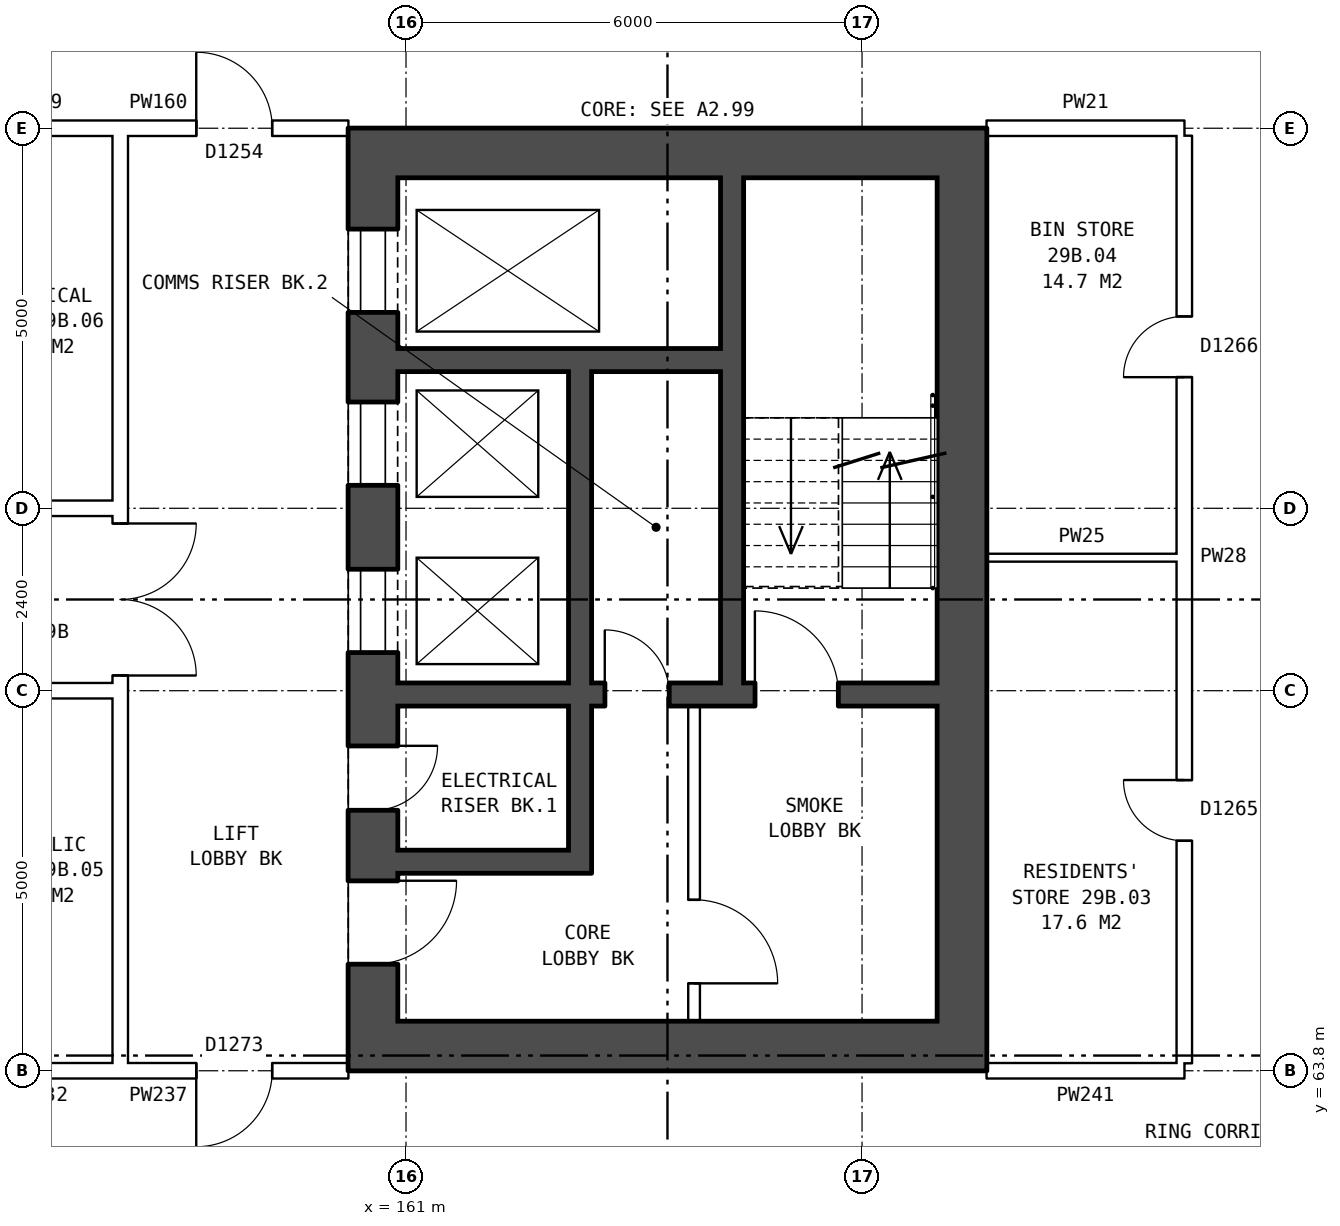
"""IFC4 building model, lengths in metres.
Left out: names, types, materials, properties, quantities, classifications, styles, units other than length and angle.
Written with IfcOpenShell. Run it as: python <this file> out.ifc"""

import sys

from ifc_helpers import new_model, si_unit, direction, frame, frame_2d, origin, place, context, subcontext, project, spatial, rectangle, extrude, element, fill, save


model = new_model("IFC4")
c1 = context("Model", 3, precision=1e-05, world=origin(), true_north=direction((0.0, 1.0)))
c2 = subcontext(c1, "Body", "Model", "MODEL_VIEW")
j1 = project(units=[si_unit("LENGTHUNIT", "METRE"), si_unit("PLANEANGLEUNIT", "RADIAN")], contexts=[c1])
p1 = place(None, origin())
s1 = spatial("IfcSite", under=j1, at=p1, CompositionType="ELEMENT")
p2 = place(p1, origin())
s2 = spatial("IfcBuilding", under=s1, at=p2, CompositionType="ELEMENT")
p3 = place(p2, frame((0.0, 0.0, 105.7)))
s3 = spatial("IfcBuildingStorey", under=s2, at=p3, CompositionType="ELEMENT", Elevation=105.7)
p4 = place(p3, frame((160.565, 75.55, 0.0), z_axis=(0.0, 0.0, 1.0), x_axis=(0.0, -1.0, 0.0)))
e1 = element("IfcWall", 1, at=p4, inside=s3, PredefinedType="SHEAR", context=c2, shape_type="SweptSolid", body=[
    extrude(rectangle(XDim=11.1, YDim=0.65, at=frame_2d((5.55, 0.0))), origin(), (0.0, 0.0, 1.0), 2.85),
])
p5 = place(p4, frame((0.675, 0.0, 0.0)))
e2 = element("IfcOpeningElement", 2, at=p5, cuts=e1, PredefinedType="OPENING", context=c2, shape_type="SweptSolid", body=[
    extrude(rectangle(XDim=1.1, YDim=2.1, at=frame_2d((0.55, 1.05))), frame((0.0, 0.335, 0.0), z_axis=(0.0, -1.0, 0.0), x_axis=(1.0, 0.0, 0.0)), (0.0, 0.0, 1.0), 0.67),
])
p6 = place(p4, frame((2.95, 0.0, 0.0)))
e3 = element("IfcOpeningElement", 3, at=p6, cuts=e1, PredefinedType="OPENING", context=c2, shape_type="SweptSolid", body=[
    extrude(rectangle(XDim=1.1, YDim=2.1, at=frame_2d((0.55, 1.05))), frame((0.0, 0.335, 0.0), z_axis=(0.0, -1.0, 0.0), x_axis=(1.0, 0.0, 0.0)), (0.0, 0.0, 1.0), 0.67),
])
p7 = place(p4, frame((5.15, 0.0, 0.0)))
e4 = element("IfcOpeningElement", 4, at=p7, cuts=e1, PredefinedType="OPENING", context=c2, shape_type="SweptSolid", body=[
    extrude(rectangle(XDim=1.1, YDim=2.1, at=frame_2d((0.55, 1.05))), frame((0.0, 0.335, 0.0), z_axis=(0.0, -1.0, 0.0), x_axis=(1.0, 0.0, 0.0)), (0.0, 0.0, 1.0), 0.67),
])
p8 = place(p4, frame((9.25, 0.0, 0.0)))
e5 = element("IfcOpeningElement", 5, at=p8, cuts=e1, PredefinedType="OPENING", context=c2, shape_type="SweptSolid", body=[
    extrude(rectangle(XDim=1.1, YDim=2.1, at=frame_2d((0.55, 1.05))), frame((0.0, 0.335, 0.0), z_axis=(0.0, -1.0, 0.0), x_axis=(1.0, 0.0, 0.0)), (0.0, 0.0, 1.0), 0.67),
])
p9 = place(p4, frame((7.475, 0.0, 0.0)))
e6 = element("IfcOpeningElement", 6, at=p9, cuts=e1, PredefinedType="OPENING", context=c2, shape_type="SweptSolid", body=[
    extrude(rectangle(XDim=0.85, YDim=2.1, at=frame_2d((0.425, 1.05))), frame((0.0, 0.335, 0.0), z_axis=(0.0, -1.0, 0.0), x_axis=(1.0, 0.0, 0.0)), (0.0, 0.0, 1.0), 0.67),
])
p10 = place(p3, frame((168.315, 75.55, 0.0), z_axis=(0.0, 0.0, 1.0), x_axis=(0.0, -1.0, 0.0)))
e7 = element("IfcWall", 7, at=p10, inside=s3, PredefinedType="SHEAR", context=c2, shape_type="SweptSolid", body=[
    extrude(rectangle(XDim=11.1, YDim=0.65, at=frame_2d((5.55, 0.0))), origin(), (0.0, 0.0, 1.0), 2.85),
])
for number, where, z_axis, x_axis in (
    (8, (160.24, 75.875, 0.0), (0.0, 0.0, 1.0), (1.0, 0.0, 0.0)),
    (9, (160.24, 64.125, 0.0), (0.0, 0.0, 1.0), (1.0, 0.0, 0.0)),
):
    element("IfcWall", number, at=place(p3, frame(where, z_axis=z_axis, x_axis=x_axis)), inside=s3, PredefinedType="SHEAR", context=c2, shape_type="SweptSolid", body=[
        extrude(rectangle(XDim=8.4, YDim=0.65, at=frame_2d((4.2, 0.0))), origin(), (0.0, 0.0, 1.0), 2.85),
    ])
p11 = place(p3, frame((160.89, 73.15, 0.0), z_axis=(0.0, 0.0, 1.0), x_axis=(1.0, 0.0, 0.0)))
e10 = element("IfcWall", 10, at=p11, inside=s3, PredefinedType="SHEAR", context=c2, shape_type="SweptSolid", body=[
    extrude(rectangle(XDim=4.25, YDim=0.3, at=frame_2d((2.125, 0.0))), origin(), (0.0, 0.0, 1.0), 2.85),
])
p12 = place(p3, frame((160.89, 68.75, 0.0), z_axis=(0.0, 0.0, 1.0), x_axis=(1.0, 0.0, 0.0)))
e11 = element("IfcWall", 11, at=p12, inside=s3, PredefinedType="SHEAR", context=c2, shape_type="SweptSolid", body=[
    extrude(rectangle(XDim=7.1, YDim=0.3, at=frame_2d((3.55, 0.0))), origin(), (0.0, 0.0, 1.0), 2.85),
])
p13 = place(p12, frame((4.7, 0.0, 0.0)))
e12 = element("IfcOpeningElement", 12, at=p13, cuts=e11, PredefinedType="OPENING", context=c2, shape_type="SweptSolid", body=[
    extrude(rectangle(XDim=1.1, YDim=2.1, at=frame_2d((0.55, 1.05))), frame((0.0, 0.16, 0.0), z_axis=(0.0, -1.0, 0.0), x_axis=(1.0, 0.0, 0.0)), (0.0, 0.0, 1.0), 0.32),
])
p14 = place(p12, frame((2.725, 0.0, 0.0)))
e13 = element("IfcOpeningElement", 13, at=p14, cuts=e11, PredefinedType="OPENING", context=c2, shape_type="SweptSolid", body=[
    extrude(rectangle(XDim=0.85, YDim=2.1, at=frame_2d((0.425, 1.05))), frame((0.0, 0.16, 0.0), z_axis=(0.0, -1.0, 0.0), x_axis=(1.0, 0.0, 0.0)), (0.0, 0.0, 1.0), 0.32),
])
p15 = place(p3, frame((160.89, 66.55, 0.0), z_axis=(0.0, 0.0, 1.0), x_axis=(1.0, 0.0, 0.0)))
e14 = element("IfcWall", 14, at=p15, inside=s3, PredefinedType="SHEAR", context=c2, shape_type="SweptSolid", body=[
    extrude(rectangle(XDim=2.25, YDim=0.3, at=frame_2d((1.125, 0.0))), origin(), (0.0, 0.0, 1.0), 2.85),
])
p16 = place(p3, frame((163.29, 73.0, 0.0), z_axis=(0.0, 0.0, 1.0), x_axis=(0.0, -1.0, 0.0)))
e15 = element("IfcWall", 15, at=p16, inside=s3, PredefinedType="SHEAR", context=c2, shape_type="SweptSolid", body=[
    extrude(rectangle(XDim=4.1, YDim=0.3, at=frame_2d((2.05, 0.0))), origin(), (0.0, 0.0, 1.0), 2.85),
])
p17 = place(p3, frame((163.29, 68.6, 0.0), z_axis=(0.0, 0.0, 1.0), x_axis=(0.0, -1.0, 0.0)))
e16 = element("IfcWall", 16, at=p17, inside=s3, PredefinedType="SHEAR", context=c2, shape_type="SweptSolid", body=[
    extrude(rectangle(XDim=2.2, YDim=0.3, at=frame_2d((1.1, 0.0))), origin(), (0.0, 0.0, 1.0), 2.85),
])
p18 = place(p3, frame((164.79, 68.6, 0.0), z_axis=(0.0, 0.0, 1.0), x_axis=(0.0, -1.0, 0.0)))
e17 = element("IfcWall", 17, at=p18, inside=s3, PredefinedType="PARTITIONING", context=c2, shape_type="SweptSolid", body=[
    extrude(rectangle(XDim=4.15, YDim=0.15, at=frame_2d((2.075, 0.0))), origin(), (0.0, 0.0, 1.0), 2.85),
])
p19 = place(p18, frame((2.55, 0.0, 0.0)))
e18 = element("IfcOpeningElement", 18, at=p19, cuts=e17, PredefinedType="OPENING", context=c2, shape_type="SweptSolid", body=[
    extrude(rectangle(XDim=1.1, YDim=2.1, at=frame_2d((0.55, 1.05))), frame((0.0, 0.085, 0.0), z_axis=(0.0, -1.0, 0.0), x_axis=(1.0, 0.0, 0.0)), (0.0, 0.0, 1.0), 0.17),
])
p20 = place(p3, frame((165.29, 75.55, 0.0), z_axis=(0.0, 0.0, 1.0), x_axis=(0.0, -1.0, 0.0)))
e19 = element("IfcWall", 19, at=p20, inside=s3, PredefinedType="SHEAR", context=c2, shape_type="SweptSolid", body=[
    extrude(rectangle(XDim=6.65, YDim=0.3, at=frame_2d((3.325, 0.0))), origin(), (0.0, 0.0, 1.0), 2.85),
])
p21 = place(p3, frame((157.24, 63.9, 0.0), z_axis=(0.0, 0.0, 1.0), x_axis=(0.0, 1.0, 0.0)))
e20 = element("IfcWall", 20, at=p21, inside=s3, PredefinedType="PARTITIONING", context=c2, shape_type="SweptSolid", body=[
    extrude(rectangle(XDim=12.2, YDim=0.2, at=frame_2d((6.1, 0.0))), origin(), (0.0, 0.0, 1.0), 2.85),
])
p22 = place(p21, frame((5.1, 0.0, 0.0)))
e21 = element("IfcOpeningElement", 21, at=p22, cuts=e20, PredefinedType="OPENING", context=c2, shape_type="SweptSolid", body=[
    extrude(rectangle(XDim=2.0, YDim=2.1, at=frame_2d((1.0, 1.05))), frame((0.0, 0.11, 0.0), z_axis=(0.0, -1.0, 0.0), x_axis=(1.0, 0.0, 0.0)), (0.0, 0.0, 1.0), 0.22),
])
p23 = place(p3, frame((155.1, 63.8, 0.0), z_axis=(0.0, 0.0, 1.0), x_axis=(1.0, 0.0, 0.0)))
e22 = element("IfcWall", 22, at=p23, inside=s3, PredefinedType="PARTITIONING", context=c2, shape_type="SweptSolid", body=[
    extrude(rectangle(XDim=2.14, YDim=0.2, at=frame_2d((1.07, 0.0))), origin(), (0.0, 0.0, 1.0), 2.85),
])
p24 = place(p3, frame((157.24, 63.8, 0.0), z_axis=(0.0, 0.0, 1.0), x_axis=(1.0, 0.0, 0.0)))
e23 = element("IfcWall", 23, at=p24, inside=s3, PredefinedType="PARTITIONING", context=c2, shape_type="SweptSolid", body=[
    extrude(rectangle(XDim=3.0, YDim=0.2, at=frame_2d((1.5, 0.0))), origin(), (0.0, 0.0, 1.0), 2.85),
])
p25 = place(p24, frame((1.0, 0.0, 0.0)))
e24 = element("IfcOpeningElement", 24, at=p25, cuts=e23, PredefinedType="OPENING", context=c2, shape_type="SweptSolid", body=[
    extrude(rectangle(XDim=1.0, YDim=2.1, at=frame_2d((0.5, 1.05))), frame((0.0, 0.11, 0.0), z_axis=(0.0, -1.0, 0.0), x_axis=(1.0, 0.0, 0.0)), (0.0, 0.0, 1.0), 0.22),
])
p26 = place(p3, frame((168.64, 63.8, 0.0), z_axis=(0.0, 0.0, 1.0), x_axis=(1.0, 0.0, 0.0)))
e25 = element("IfcWall", 25, at=p26, inside=s3, PredefinedType="PARTITIONING", context=c2, shape_type="SweptSolid", body=[
    extrude(rectangle(XDim=2.6, YDim=0.2, at=frame_2d((1.3, 0.0))), origin(), (0.0, 0.0, 1.0), 2.85),
])
p27 = place(p3, frame((142.76, 68.8, 0.0), z_axis=(0.0, 0.0, 1.0), x_axis=(1.0, 0.0, 0.0)))
e26 = element("IfcWall", 26, at=p27, inside=s3, PredefinedType="PARTITIONING", context=c2, shape_type="SweptSolid", body=[
    extrude(rectangle(XDim=14.48, YDim=0.2, at=frame_2d((7.24, 0.0))), origin(), (0.0, 0.0, 1.0), 2.85),
])
p28 = place(p27, frame((4.24, 0.0, 0.0)))
e27 = element("IfcOpeningElement", 27, at=p28, cuts=e26, PredefinedType="OPENING", context=c2, shape_type="SweptSolid", body=[
    extrude(rectangle(XDim=1.0, YDim=2.1, at=frame_2d((0.5, 1.05))), frame((0.0, 0.11, 0.0), z_axis=(0.0, -1.0, 0.0), x_axis=(1.0, 0.0, 0.0)), (0.0, 0.0, 1.0), 0.22),
])
p29 = place(p27, frame((10.24, 0.0, 0.0)))
e28 = element("IfcOpeningElement", 28, at=p29, cuts=e26, PredefinedType="OPENING", context=c2, shape_type="SweptSolid", body=[
    extrude(rectangle(XDim=1.0, YDim=2.1, at=frame_2d((0.5, 1.05))), frame((0.0, 0.11, 0.0), z_axis=(0.0, -1.0, 0.0), x_axis=(1.0, 0.0, 0.0)), (0.0, 0.0, 1.0), 0.22),
])
p30 = place(p3, frame((168.64, 70.55, 0.0), z_axis=(0.0, 0.0, 1.0), x_axis=(1.0, 0.0, 0.0)))
e29 = element("IfcWall", 29, at=p30, inside=s3, PredefinedType="PARTITIONING", context=c2, shape_type="SweptSolid", body=[
    extrude(rectangle(XDim=2.5, YDim=0.1, at=frame_2d((1.25, 0.0))), origin(), (0.0, 0.0, 1.0), 2.85),
])
p31 = place(p3, frame((142.76, 71.2, 0.0), z_axis=(0.0, 0.0, 1.0), x_axis=(1.0, 0.0, 0.0)))
e30 = element("IfcWall", 30, at=p31, inside=s3, PredefinedType="PARTITIONING", context=c2, shape_type="SweptSolid", body=[
    extrude(rectangle(XDim=14.48, YDim=0.2, at=frame_2d((7.24, 0.0))), origin(), (0.0, 0.0, 1.0), 2.85),
])
p32 = place(p31, frame((4.24, 0.0, 0.0)))
e31 = element("IfcOpeningElement", 31, at=p32, cuts=e30, PredefinedType="OPENING", context=c2, shape_type="SweptSolid", body=[
    extrude(rectangle(XDim=1.0, YDim=2.1, at=frame_2d((0.5, 1.05))), frame((0.0, 0.11, 0.0), z_axis=(0.0, -1.0, 0.0), x_axis=(1.0, 0.0, 0.0)), (0.0, 0.0, 1.0), 0.22),
])
p33 = place(p31, frame((10.24, 0.0, 0.0)))
e32 = element("IfcOpeningElement", 32, at=p33, cuts=e30, PredefinedType="OPENING", context=c2, shape_type="SweptSolid", body=[
    extrude(rectangle(XDim=1.0, YDim=2.1, at=frame_2d((0.5, 1.05))), frame((0.0, 0.11, 0.0), z_axis=(0.0, -1.0, 0.0), x_axis=(1.0, 0.0, 0.0)), (0.0, 0.0, 1.0), 0.22),
])
p34 = place(p3, frame((155.1, 76.2, 0.0), z_axis=(0.0, 0.0, 1.0), x_axis=(1.0, 0.0, 0.0)))
e33 = element("IfcWall", 33, at=p34, inside=s3, PredefinedType="PARTITIONING", context=c2, shape_type="SweptSolid", body=[
    extrude(rectangle(XDim=2.14, YDim=0.2, at=frame_2d((1.07, 0.0))), origin(), (0.0, 0.0, 1.0), 2.85),
])
p35 = place(p3, frame((157.24, 76.2, 0.0), z_axis=(0.0, 0.0, 1.0), x_axis=(1.0, 0.0, 0.0)))
e34 = element("IfcWall", 34, at=p35, inside=s3, PredefinedType="PARTITIONING", context=c2, shape_type="SweptSolid", body=[
    extrude(rectangle(XDim=3.0, YDim=0.2, at=frame_2d((1.5, 0.0))), origin(), (0.0, 0.0, 1.0), 2.85),
])
p36 = place(p35, frame((1.0, 0.0, 0.0)))
e35 = element("IfcOpeningElement", 35, at=p36, cuts=e34, PredefinedType="OPENING", context=c2, shape_type="SweptSolid", body=[
    extrude(rectangle(XDim=1.0, YDim=2.1, at=frame_2d((0.5, 1.05))), frame((0.0, 0.11, 0.0), z_axis=(0.0, -1.0, 0.0), x_axis=(1.0, 0.0, 0.0)), (0.0, 0.0, 1.0), 0.22),
])
p37 = place(p3, frame((168.64, 76.2, 0.0), z_axis=(0.0, 0.0, 1.0), x_axis=(1.0, 0.0, 0.0)))
e36 = element("IfcWall", 36, at=p37, inside=s3, PredefinedType="PARTITIONING", context=c2, shape_type="SweptSolid", body=[
    extrude(rectangle(XDim=2.6, YDim=0.2, at=frame_2d((1.3, 0.0))), origin(), (0.0, 0.0, 1.0), 2.85),
])
p38 = place(p3, frame((171.24, 63.9, 0.0), z_axis=(0.0, 0.0, 1.0), x_axis=(0.0, 1.0, 0.0)))
e37 = element("IfcWall", 37, at=p38, inside=s3, PredefinedType="PARTITIONING", context=c2, shape_type="SweptSolid", body=[
    extrude(rectangle(XDim=12.2, YDim=0.2, at=frame_2d((6.1, 0.0))), origin(), (0.0, 0.0, 1.0), 2.85),
])
p39 = place(p38, frame((2.925, 0.0, 0.0)))
e38 = element("IfcOpeningElement", 38, at=p39, cuts=e37, PredefinedType="OPENING", context=c2, shape_type="SweptSolid", body=[
    extrude(rectangle(XDim=0.8, YDim=2.1, at=frame_2d((0.4, 1.05))), frame((0.0, 0.11, 0.0), z_axis=(0.0, -1.0, 0.0), x_axis=(1.0, 0.0, 0.0)), (0.0, 0.0, 1.0), 0.22),
])
p40 = place(p38, frame((9.025, 0.0, 0.0)))
e39 = element("IfcOpeningElement", 39, at=p40, cuts=e37, PredefinedType="OPENING", context=c2, shape_type="SweptSolid", body=[
    extrude(rectangle(XDim=0.8, YDim=2.1, at=frame_2d((0.4, 1.05))), frame((0.0, 0.11, 0.0), z_axis=(0.0, -1.0, 0.0), x_axis=(1.0, 0.0, 0.0)), (0.0, 0.0, 1.0), 0.22),
])
p41 = place(p5, origin())
e40 = element("IfcDoor", 40, at=p41, inside=s3, OperationType="DOUBLE_DOOR_SLIDING", PredefinedType="DOOR", context=c2, shape_type="SweptSolid", body=[
    extrude(rectangle(XDim=1.1, YDim=2.1, at=frame_2d((0.55, 1.05))), frame((0.0, 0.31, 0.0), z_axis=(0.0, -1.0, 0.0), x_axis=(1.0, 0.0, 0.0)), (0.0, 0.0, 1.0), 0.05),
])
fill(e2, e40)
p42 = place(p6, origin())
e41 = element("IfcDoor", 41, at=p42, inside=s3, OperationType="DOUBLE_DOOR_SLIDING", PredefinedType="DOOR", context=c2, shape_type="SweptSolid", body=[
    extrude(rectangle(XDim=1.1, YDim=2.1, at=frame_2d((0.55, 1.05))), frame((0.0, 0.31, 0.0), z_axis=(0.0, -1.0, 0.0), x_axis=(1.0, 0.0, 0.0)), (0.0, 0.0, 1.0), 0.05),
])
fill(e3, e41)
p43 = place(p7, origin())
e42 = element("IfcDoor", 42, at=p43, inside=s3, OperationType="DOUBLE_DOOR_SLIDING", PredefinedType="DOOR", context=c2, shape_type="SweptSolid", body=[
    extrude(rectangle(XDim=1.1, YDim=2.1, at=frame_2d((0.55, 1.05))), frame((0.0, 0.31, 0.0), z_axis=(0.0, -1.0, 0.0), x_axis=(1.0, 0.0, 0.0)), (0.0, 0.0, 1.0), 0.05),
])
fill(e4, e42)
p44 = place(p8, origin())
e43 = element("IfcDoor", 43, at=p44, inside=s3, OperationType="SINGLE_SWING_LEFT", PredefinedType="DOOR", context=c2, shape_type="SweptSolid", body=[
    extrude(rectangle(XDim=1.1, YDim=2.1, at=frame_2d((0.55, 1.05))), frame((0.0, 0.31, 0.0), z_axis=(0.0, -1.0, 0.0), x_axis=(1.0, 0.0, 0.0)), (0.0, 0.0, 1.0), 0.05),
])
fill(e5, e43)
p45 = place(p19, origin())
e44 = element("IfcDoor", 44, at=p45, inside=s3, OperationType="SINGLE_SWING_RIGHT", PredefinedType="DOOR", context=c2, shape_type="SweptSolid", body=[
    extrude(rectangle(XDim=1.1, YDim=2.1, at=frame_2d((0.55, 1.05))), frame((0.0, 0.025, 0.0), z_axis=(0.0, -1.0, 0.0), x_axis=(1.0, 0.0, 0.0)), (0.0, 0.0, 1.0), 0.05),
])
fill(e18, e44)
p46 = place(p13, origin())
e45 = element("IfcDoor", 45, at=p46, inside=s3, OperationType="SINGLE_SWING_LEFT", PredefinedType="DOOR", context=c2, shape_type="SweptSolid", body=[
    extrude(rectangle(XDim=1.1, YDim=2.1, at=frame_2d((0.55, 1.05))), frame((0.0, 0.025, 0.0), z_axis=(0.0, -1.0, 0.0), x_axis=(1.0, 0.0, 0.0)), (0.0, 0.0, 1.0), 0.05),
])
fill(e12, e45)
p47 = place(p9, origin())
e46 = element("IfcDoor", 46, at=p47, inside=s3, OperationType="SINGLE_SWING_LEFT", PredefinedType="DOOR", context=c2, shape_type="SweptSolid", body=[
    extrude(rectangle(XDim=0.85, YDim=2.1, at=frame_2d((0.425, 1.05))), frame((0.0, 0.31, 0.0), z_axis=(0.0, -1.0, 0.0), x_axis=(1.0, 0.0, 0.0)), (0.0, 0.0, 1.0), 0.05),
])
fill(e6, e46)
p48 = place(p14, origin())
e47 = element("IfcDoor", 47, at=p48, inside=s3, OperationType="SINGLE_SWING_LEFT", PredefinedType="DOOR", context=c2, shape_type="SweptSolid", body=[
    extrude(rectangle(XDim=0.85, YDim=2.1, at=frame_2d((0.425, 1.05))), frame((0.0, 0.025, 0.0), z_axis=(0.0, -1.0, 0.0), x_axis=(1.0, 0.0, 0.0)), (0.0, 0.0, 1.0), 0.05),
])
fill(e13, e47)
p49 = place(p22, frame((2.0, 0.0, 0.0), z_axis=(0.0, 0.0, 1.0), x_axis=(-1.0, 0.0, 0.0)))
e48 = element("IfcDoor", 48, at=p49, inside=s3, OperationType="DOUBLE_DOOR_SINGLE_SWING", PredefinedType="DOOR", context=c2, shape_type="SweptSolid", body=[
    extrude(rectangle(XDim=2.0, YDim=2.1, at=frame_2d((1.0, 1.05))), frame((0.0, 0.025, 0.0), z_axis=(0.0, -1.0, 0.0), x_axis=(1.0, 0.0, 0.0)), (0.0, 0.0, 1.0), 0.05),
])
fill(e21, e48)
p50 = place(p25, frame((1.0, 0.0, 0.0), z_axis=(0.0, 0.0, 1.0), x_axis=(-1.0, 0.0, 0.0)))
e49 = element("IfcDoor", 49, at=p50, inside=s3, OperationType="SINGLE_SWING_RIGHT", PredefinedType="DOOR", context=c2, shape_type="SweptSolid", body=[
    extrude(rectangle(XDim=1.0, YDim=2.1, at=frame_2d((0.5, 1.05))), frame((0.0, 0.025, 0.0), z_axis=(0.0, -1.0, 0.0), x_axis=(1.0, 0.0, 0.0)), (0.0, 0.0, 1.0), 0.05),
])
fill(e24, e49)
p51 = place(p36, origin())
e50 = element("IfcDoor", 50, at=p51, inside=s3, OperationType="SINGLE_SWING_LEFT", PredefinedType="DOOR", context=c2, shape_type="SweptSolid", body=[
    extrude(rectangle(XDim=1.0, YDim=2.1, at=frame_2d((0.5, 1.05))), frame((0.0, 0.025, 0.0), z_axis=(0.0, -1.0, 0.0), x_axis=(1.0, 0.0, 0.0)), (0.0, 0.0, 1.0), 0.05),
])
fill(e35, e50)
p52 = place(p39, origin())
e51 = element("IfcDoor", 51, at=p52, inside=s3, OperationType="SINGLE_SWING_RIGHT", PredefinedType="DOOR", context=c2, shape_type="SweptSolid", body=[
    extrude(rectangle(XDim=0.8, YDim=2.1, at=frame_2d((0.4, 1.05))), frame((0.0, 0.025, 0.0), z_axis=(0.0, -1.0, 0.0), x_axis=(1.0, 0.0, 0.0)), (0.0, 0.0, 1.0), 0.05),
])
fill(e38, e51)
p53 = place(p40, origin())
e52 = element("IfcDoor", 52, at=p53, inside=s3, OperationType="SINGLE_SWING_LEFT", PredefinedType="DOOR", context=c2, shape_type="SweptSolid", body=[
    extrude(rectangle(XDim=0.8, YDim=2.1, at=frame_2d((0.4, 1.05))), frame((0.0, 0.025, 0.0), z_axis=(0.0, -1.0, 0.0), x_axis=(1.0, 0.0, 0.0)), (0.0, 0.0, 1.0), 0.05),
])
fill(e39, e52)
save(model, sys.argv[1])
